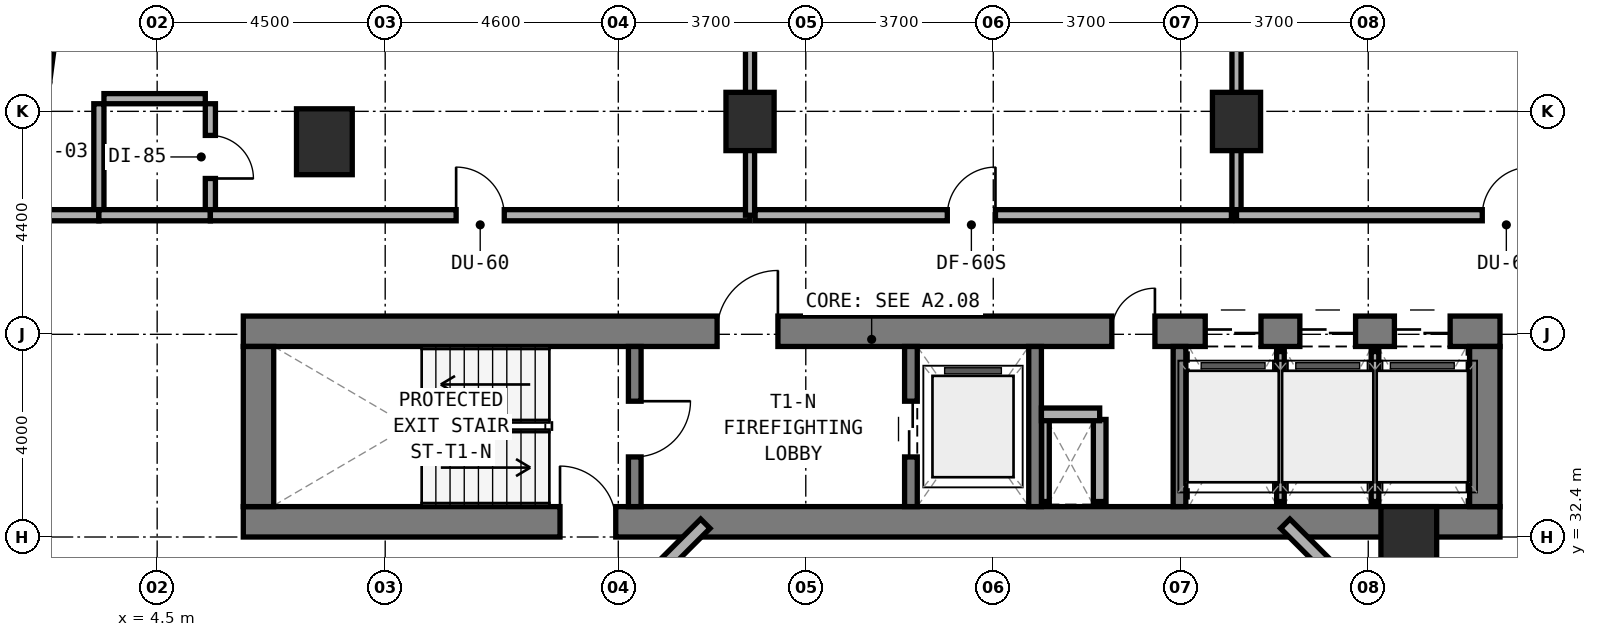
"""IFC4 building model, lengths in metres.
Left out: names, types, materials, properties, quantities, classifications, styles, units other than length and angle.
Written with IfcOpenShell. Run it as: python <this file> out.ifc"""

import sys

from ifc_helpers import new_model, si_unit, direction, frame, frame_2d, origin, origin_2d, place, context, subcontext, project, spatial, rectangle, extrude, element, fill, save


model = new_model("IFC4")
c1 = context("Model", 3, precision=1e-05, world=origin(), true_north=direction((0.0, 1.0)))
c2 = subcontext(c1, "Body", "Model", "MODEL_VIEW")
j1 = project(units=[si_unit("LENGTHUNIT", "METRE"), si_unit("PLANEANGLEUNIT", "RADIAN")], contexts=[c1])
p1 = place(None, origin())
s1 = spatial("IfcSite", under=j1, at=p1, CompositionType="ELEMENT")
p2 = place(p1, origin())
s2 = spatial("IfcBuilding", under=s1, at=p2, CompositionType="ELEMENT")
p3 = place(p2, frame((0.0, 0.0, 24.0)))
s3 = spatial("IfcBuildingStorey", under=s2, at=p3, CompositionType="ELEMENT", Elevation=24.0)
p4 = place(p3, frame((6.2, 32.7, 0.0), z_axis=(0.0, 0.0, 1.0), x_axis=(1.0, 0.0, 0.0)))
e1 = element("IfcWall", 1, at=p4, inside=s3, PredefinedType="SHEAR", context=c2, shape_type="SweptSolid", body=[
    extrude(rectangle(XDim=24.8, YDim=0.6, at=frame_2d((12.4, 0.0))), origin(), (0.0, 0.0, 1.0), 3.5),
])
p5 = place(p4, frame((6.25, 0.0, 0.0)))
e2 = element("IfcOpeningElement", 2, at=p5, cuts=e1, PredefinedType="OPENING", context=c2, shape_type="SweptSolid", body=[
    extrude(rectangle(XDim=1.1, YDim=2.15, at=frame_2d((0.55, 1.075))), frame((0.0, 0.31, 0.0), z_axis=(0.0, -1.0, 0.0), x_axis=(1.0, 0.0, 0.0)), (0.0, 0.0, 1.0), 0.62),
])
p6 = place(p3, frame((6.2, 36.46, 0.0), z_axis=(0.0, 0.0, 1.0), x_axis=(1.0, 0.0, 0.0)))
e3 = element("IfcWall", 3, at=p6, inside=s3, PredefinedType="SHEAR", context=c2, shape_type="SweptSolid", body=[
    extrude(rectangle(XDim=24.8, YDim=0.6, at=frame_2d((12.4, 0.0))), origin(), (0.0, 0.0, 1.0), 3.5),
])
p7 = place(p6, frame((9.35, 0.0, 0.0)))
e4 = element("IfcOpeningElement", 4, at=p7, cuts=e3, PredefinedType="OPENING", context=c2, shape_type="SweptSolid", body=[
    extrude(rectangle(XDim=1.2, YDim=2.15, at=frame_2d((0.6, 1.075))), frame((0.0, 0.31, 0.0), z_axis=(0.0, -1.0, 0.0), x_axis=(1.0, 0.0, 0.0)), (0.0, 0.0, 1.0), 0.62),
])
p8 = place(p6, frame((17.14, 0.0, 0.0)))
e5 = element("IfcOpeningElement", 5, at=p8, cuts=e3, PredefinedType="OPENING", context=c2, shape_type="SweptSolid", body=[
    extrude(rectangle(XDim=0.85, YDim=2.1, at=frame_2d((0.425, 1.05))), frame((0.0, 0.31, 0.0), z_axis=(0.0, -1.0, 0.0), x_axis=(1.0, 0.0, 0.0)), (0.0, 0.0, 1.0), 0.62),
])
p9 = place(p6, frame((18.983, 0.0, 0.0)))
e6 = element("IfcOpeningElement", 6, at=p9, cuts=e3, PredefinedType="OPENING", context=c2, shape_type="SweptSolid", body=[
    extrude(rectangle(XDim=1.1, YDim=2.15, at=frame_2d((0.55, 1.075))), frame((0.0, 0.31, 0.0), z_axis=(0.0, -1.0, 0.0), x_axis=(1.0, 0.0, 0.0)), (0.0, 0.0, 1.0), 0.62),
])
p10 = place(p6, frame((20.85, 0.0, 0.0)))
e7 = element("IfcOpeningElement", 7, at=p10, cuts=e3, PredefinedType="OPENING", context=c2, shape_type="SweptSolid", body=[
    extrude(rectangle(XDim=1.1, YDim=2.15, at=frame_2d((0.55, 1.075))), frame((0.0, 0.31, 0.0), z_axis=(0.0, -1.0, 0.0), x_axis=(1.0, 0.0, 0.0)), (0.0, 0.0, 1.0), 0.62),
])
p11 = place(p6, frame((22.716, 0.0, 0.0)))
e8 = element("IfcOpeningElement", 8, at=p11, cuts=e3, PredefinedType="OPENING", context=c2, shape_type="SweptSolid", body=[
    extrude(rectangle(XDim=1.1, YDim=2.15, at=frame_2d((0.55, 1.075))), frame((0.0, 0.31, 0.0), z_axis=(0.0, -1.0, 0.0), x_axis=(1.0, 0.0, 0.0)), (0.0, 0.0, 1.0), 0.62),
])
for number, where, z_axis, x_axis in (
    (9, (6.5, 33.0, 0.0), (0.0, 0.0, 1.0), (0.0, 1.0, 0.0)),
    (10, (30.7, 33.0, 0.0), (0.0, 0.0, 1.0), (0.0, 1.0, 0.0)),
):
    element("IfcWall", number, at=place(p3, frame(where, z_axis=z_axis, x_axis=x_axis)), inside=s3, PredefinedType="SHEAR", context=c2, shape_type="SweptSolid", body=[
        extrude(rectangle(XDim=3.16, YDim=0.6, at=frame_2d((1.58, 0.0))), origin(), (0.0, 0.0, 1.0), 3.5),
    ])
p12 = place(p3, frame((13.925, 33.0, 0.0), z_axis=(0.0, 0.0, 1.0), x_axis=(0.0, 1.0, 0.0)))
e11 = element("IfcWall", 11, at=p12, inside=s3, PredefinedType="STANDARD", context=c2, shape_type="SweptSolid", body=[
    extrude(rectangle(XDim=3.16, YDim=0.25, at=frame_2d((1.58, 0.0))), origin(), (0.0, 0.0, 1.0), 3.22),
])
p13 = place(p12, frame((0.98, 0.0, 0.0)))
e12 = element("IfcOpeningElement", 12, at=p13, cuts=e11, PredefinedType="OPENING", context=c2, shape_type="SweptSolid", body=[
    extrude(rectangle(XDim=1.1, YDim=2.15, at=frame_2d((0.55, 1.075))), frame((0.0, 0.135, 0.0), z_axis=(0.0, -1.0, 0.0), x_axis=(1.0, 0.0, 0.0)), (0.0, 0.0, 1.0), 0.27),
])
p14 = place(p3, frame((19.375, 33.0, 0.0), z_axis=(0.0, 0.0, 1.0), x_axis=(0.0, 1.0, 0.0)))
e13 = element("IfcWall", 13, at=p14, inside=s3, PredefinedType="STANDARD", context=c2, shape_type="SweptSolid", body=[
    extrude(rectangle(XDim=3.16, YDim=0.25, at=frame_2d((1.58, 0.0))), origin(), (0.0, 0.0, 1.0), 3.22),
])
p15 = place(p14, frame((0.98, 0.0, 0.0)))
e14 = element("IfcOpeningElement", 14, at=p15, cuts=e13, PredefinedType="OPENING", context=c2, shape_type="SweptSolid", body=[
    extrude(rectangle(XDim=1.1, YDim=2.15, at=frame_2d((0.55, 1.075))), frame((0.0, 0.135, 0.0), z_axis=(0.0, -1.0, 0.0), x_axis=(1.0, 0.0, 0.0)), (0.0, 0.0, 1.0), 0.27),
])
for number, where, z_axis, x_axis in (
    (15, (21.825, 33.0, 0.0), (0.0, 0.0, 1.0), (0.0, 1.0, 0.0)),
    (16, (24.675, 33.0, 0.0), (0.0, 0.0, 1.0), (0.0, 1.0, 0.0)),
):
    element("IfcWall", number, at=place(p3, frame(where, z_axis=z_axis, x_axis=x_axis)), inside=s3, PredefinedType="STANDARD", context=c2, shape_type="SweptSolid", body=[
        extrude(rectangle(XDim=3.16, YDim=0.25, at=frame_2d((1.58, 0.0))), origin(), (0.0, 0.0, 1.0), 3.22),
    ])
for number, where, z_axis, x_axis in (
    (17, (16.2, 40.6, 0.0), (0.0, 0.0, 1.0), (1.0, 0.0, 0.0)),
    (18, (25.8, 40.6, 0.0), (0.0, 0.0, 1.0), (1.0, 0.0, 0.0)),
):
    element("IfcColumn", number, at=place(p3, frame(where, z_axis=z_axis, x_axis=x_axis)), inside=s3, PredefinedType="COLUMN", context=c2, shape_type="SweptSolid", body=[
        extrude(rectangle(XDim=0.95, YDim=1.15, at=origin_2d()), origin(), (0.0, 0.0, 1.0), 3.5),
    ])
for number, where, z_axis, x_axis in (
    (19, (7.8, 40.2, 0.0), (0.0, 0.0, 1.0), (1.0, 0.0, 0.0)),
    (20, (29.2, 32.35, 0.0), (0.0, 0.0, 1.0), (1.0, 0.0, 0.0)),
):
    element("IfcColumn", number, at=place(p3, frame(where, z_axis=z_axis, x_axis=x_axis)), inside=s3, PredefinedType="COLUMN", context=c2, shape_type="SweptSolid", body=[
        extrude(rectangle(XDim=1.1, YDim=1.3, at=origin_2d()), origin(), (0.0, 0.0, 1.0), 3.5),
    ])
p16 = place(p3, frame((2.355, 42.337, 0.0), z_axis=(0.0, 0.0, 1.0), x_axis=(-0.130454512571, -0.991454295543, 0.0)))
e21 = element("IfcWall", 21, at=p16, inside=s3, PredefinedType="STANDARD", context=c2, shape_type="SweptSolid", body=[
    extrude(rectangle(XDim=0.973, YDim=0.3, at=frame_2d((0.487, 0.0))), origin(), (0.0, 0.0, 1.0), 3.22),
])
p17 = place(p3, frame((28.596, 30.828, 0.0), z_axis=(0.0, 0.0, 1.0), x_axis=(-0.707059717605, 0.707153841636, 0.0)))
e22 = element("IfcWall", 22, at=p17, inside=s3, PredefinedType="STANDARD", context=c2, shape_type="SweptSolid", body=[
    extrude(rectangle(XDim=2.594, YDim=0.26, at=frame_2d((1.297, 0.0))), origin(), (0.0, 0.0, 1.0), 3.22),
])
p18 = place(p3, frame((15.318, 32.662, 0.0), z_axis=(0.0, 0.0, 1.0), x_axis=(-0.707106781187, -0.707106781187, 0.0)))
e23 = element("IfcWall", 23, at=p18, inside=s3, PredefinedType="STANDARD", context=c2, shape_type="SweptSolid", body=[
    extrude(rectangle(XDim=2.594, YDim=0.26, at=frame_2d((1.297, 0.0))), origin(), (0.0, 0.0, 1.0), 3.22),
])
p19 = place(p3, frame((22.03, 33.1, 0.0), z_axis=(0.0, 0.0, 1.0), x_axis=(0.0, 1.0, 0.0)))
e24 = element("IfcWall", 24, at=p19, inside=s3, PredefinedType="PARTITIONING", context=c2, shape_type="SweptSolid", body=[
    extrude(rectangle(XDim=1.62, YDim=0.15, at=frame_2d((0.81, 0.0))), origin(), (0.0, 0.0, 1.0), 3.22),
])
p20 = place(p3, frame((23.1, 33.1, 0.0), z_axis=(0.0, 0.0, 1.0), x_axis=(0.0, 1.0, 0.0)))
e25 = element("IfcWall", 25, at=p20, inside=s3, PredefinedType="SOLIDWALL", context=c2, shape_type="SweptSolid", body=[
    extrude(rectangle(XDim=1.62, YDim=0.25, at=frame_2d((0.81, 0.0))), origin(), (0.0, 0.0, 1.0), 3.22),
])
p21 = place(p3, frame((21.95, 34.82, 0.0), z_axis=(0.0, 0.0, 1.0), x_axis=(1.0, 0.0, 0.0)))
e26 = element("IfcWall", 26, at=p21, inside=s3, PredefinedType="SOLIDWALL", context=c2, shape_type="SweptSolid", body=[
    extrude(rectangle(XDim=1.15, YDim=0.25, at=frame_2d((0.575, 0.0))), origin(), (0.0, 0.0, 1.0), 3.22),
])
p22 = place(p3, frame((26.667, 33.1, 0.0), z_axis=(0.0, 0.0, 1.0), x_axis=(0.0, 1.0, 0.0)))
e27 = element("IfcWall", 27, at=p22, inside=s3, PredefinedType="PARTITIONING", context=c2, shape_type="SweptSolid", body=[
    extrude(rectangle(XDim=2.96, YDim=0.15, at=frame_2d((1.48, 0.0))), origin(), (0.0, 0.0, 1.0), 3.22),
])
p23 = place(p3, frame((28.533, 33.1, 0.0), z_axis=(0.0, 0.0, 1.0), x_axis=(0.0, 1.0, 0.0)))
e28 = element("IfcWall", 28, at=p23, inside=s3, PredefinedType="PARTITIONING", context=c2, shape_type="SweptSolid", body=[
    extrude(rectangle(XDim=2.96, YDim=0.15, at=frame_2d((1.48, 0.0))), origin(), (0.0, 0.0, 1.0), 2.295),
])
p24 = place(p3, frame((5.55, 38.85, 0.0), z_axis=(0.0, 0.0, 1.0), x_axis=(0.0, 1.0, 0.0)))
e29 = element("IfcWall", 29, at=p24, inside=s3, PredefinedType="PLUMBINGWALL", context=c2, shape_type="SweptSolid", body=[
    extrude(rectangle(XDim=2.1, YDim=0.2, at=frame_2d((1.05, 0.0))), origin(), (0.0, 0.0, 1.0), 3.22),
])
p25 = place(p24, frame((0.625, 0.0, 0.0)))
e30 = element("IfcOpeningElement", 30, at=p25, cuts=e29, PredefinedType="OPENING", context=c2, shape_type="SweptSolid", body=[
    extrude(rectangle(XDim=0.85, YDim=2.1, at=frame_2d((0.425, 1.05))), frame((0.0, 0.11, 0.0), z_axis=(0.0, -1.0, 0.0), x_axis=(1.0, 0.0, 0.0)), (0.0, 0.0, 1.0), 0.22),
])
p26 = place(p3, frame((3.45, 41.05, 0.0), z_axis=(0.0, 0.0, 1.0), x_axis=(1.0, 0.0, 0.0)))
e31 = element("IfcWall", 31, at=p26, inside=s3, PredefinedType="PLUMBINGWALL", context=c2, shape_type="SweptSolid", body=[
    extrude(rectangle(XDim=2.0, YDim=0.2, at=frame_2d((1.0, 0.0))), origin(), (0.0, 0.0, 1.0), 3.22),
])
p27 = place(p3, frame((3.35, 38.85, 0.0), z_axis=(0.0, 0.0, 1.0), x_axis=(0.0, 1.0, 0.0)))
e32 = element("IfcWall", 32, at=p27, inside=s3, PredefinedType="PLUMBINGWALL", context=c2, shape_type="SweptSolid", body=[
    extrude(rectangle(XDim=2.1, YDim=0.2, at=frame_2d((1.05, 0.0))), origin(), (0.0, 0.0, 1.0), 3.22),
])
p28 = place(p3, frame((0.24, 38.75, 0.0), z_axis=(0.0, 0.0, 1.0), x_axis=(1.0, 0.0, 0.0)))
e33 = element("IfcWall", 33, at=p28, inside=s3, PredefinedType="SOLIDWALL", context=c2, shape_type="SweptSolid", body=[
    extrude(rectangle(XDim=3.11, YDim=0.22, at=frame_2d((1.555, 0.0))), origin(), (0.0, 0.0, 1.0), 3.22),
])
p29 = place(p3, frame((3.35, 38.75, 0.0), z_axis=(0.0, 0.0, 1.0), x_axis=(1.0, 0.0, 0.0)))
e34 = element("IfcWall", 34, at=p29, inside=s3, PredefinedType="SOLIDWALL", context=c2, shape_type="SweptSolid", body=[
    extrude(rectangle(XDim=2.2, YDim=0.22, at=frame_2d((1.1, 0.0))), origin(), (0.0, 0.0, 1.0), 3.22),
])
p30 = place(p3, frame((5.55, 38.75, 0.0), z_axis=(0.0, 0.0, 1.0), x_axis=(1.0, 0.0, 0.0)))
e35 = element("IfcWall", 35, at=p30, inside=s3, PredefinedType="SOLIDWALL", context=c2, shape_type="SweptSolid", body=[
    extrude(rectangle(XDim=10.65, YDim=0.22, at=frame_2d((5.325, 0.0))), origin(), (0.0, 0.0, 1.0), 2.295),
])
p31 = place(p30, frame((4.85, 0.0, 0.0)))
e36 = element("IfcOpeningElement", 36, at=p31, cuts=e35, PredefinedType="OPENING", context=c2, shape_type="SweptSolid", body=[
    extrude(rectangle(XDim=0.95, YDim=2.1, at=frame_2d((0.475, 1.05))), frame((0.0, 0.12, 0.0), z_axis=(0.0, -1.0, 0.0), x_axis=(1.0, 0.0, 0.0)), (0.0, 0.0, 1.0), 0.24),
])
p32 = place(p3, frame((16.2, 38.75, 0.0), z_axis=(0.0, 0.0, 1.0), x_axis=(0.0, 1.0, 0.0)))
e37 = element("IfcWall", 37, at=p32, inside=s3, PredefinedType="SOLIDWALL", context=c2, shape_type="SweptSolid", body=[
    extrude(rectangle(XDim=8.19, YDim=0.18, at=frame_2d((4.095, 0.0))), origin(), (0.0, 0.0, 1.0), 2.295),
])
p33 = place(p3, frame((16.3, 38.75, 0.0), z_axis=(0.0, 0.0, 1.0), x_axis=(1.0, 0.0, 0.0)))
e38 = element("IfcWall", 38, at=p33, inside=s3, PredefinedType="SOLIDWALL", context=c2, shape_type="SweptSolid", body=[
    extrude(rectangle(XDim=9.4, YDim=0.22, at=frame_2d((4.7, 0.0))), origin(), (0.0, 0.0, 1.0), 2.955),
])
p34 = place(p33, frame((3.793, 0.0, 0.0)))
e39 = element("IfcOpeningElement", 39, at=p34, cuts=e38, PredefinedType="OPENING", context=c2, shape_type="SweptSolid", body=[
    extrude(rectangle(XDim=0.95, YDim=2.1, at=frame_2d((0.475, 1.05))), frame((0.0, 0.12, 0.0), z_axis=(0.0, -1.0, 0.0), x_axis=(1.0, 0.0, 0.0)), (0.0, 0.0, 1.0), 0.24),
])
p35 = place(p3, frame((25.8, 38.75, 0.0), z_axis=(0.0, 0.0, 1.0), x_axis=(0.0, 1.0, 0.0)))
e40 = element("IfcWall", 40, at=p35, inside=s3, PredefinedType="SOLIDWALL", context=c2, shape_type="SweptSolid", body=[
    extrude(rectangle(XDim=8.19, YDim=0.18, at=frame_2d((4.095, 0.0))), origin(), (0.0, 0.0, 1.0), 2.295),
])
p36 = place(p3, frame((25.8, 38.75, 0.0), z_axis=(0.0, 0.0, 1.0), x_axis=(1.0, 0.0, 0.0)))
e41 = element("IfcWall", 41, at=p36, inside=s3, PredefinedType="SOLIDWALL", context=c2, shape_type="SweptSolid", body=[
    extrude(rectangle(XDim=10.65, YDim=0.22, at=frame_2d((5.325, 0.0))), origin(), (0.0, 0.0, 1.0), 2.295),
])
p37 = place(p36, frame((4.85, 0.0, 0.0)))
e42 = element("IfcOpeningElement", 42, at=p37, cuts=e41, PredefinedType="OPENING", context=c2, shape_type="SweptSolid", body=[
    extrude(rectangle(XDim=0.95, YDim=2.1, at=frame_2d((0.475, 1.05))), frame((0.0, 0.12, 0.0), z_axis=(0.0, -1.0, 0.0), x_axis=(1.0, 0.0, 0.0)), (0.0, 0.0, 1.0), 0.24),
])
p38 = place(p13, frame((1.1, 0.0, 0.0), z_axis=(0.0, 0.0, 1.0), x_axis=(-1.0, 0.0, 0.0)))
e43 = element("IfcDoor", 43, at=p38, inside=s3, OperationType="SINGLE_SWING_LEFT", PredefinedType="DOOR", context=c2, shape_type="SweptSolid", body=[
    extrude(rectangle(XDim=1.1, YDim=2.15, at=frame_2d((0.55, 1.075))), frame((0.0, 0.025, 0.0), z_axis=(0.0, -1.0, 0.0), x_axis=(1.0, 0.0, 0.0)), (0.0, 0.0, 1.0), 0.05),
])
fill(e12, e43)
p39 = place(p7, origin())
e44 = element("IfcDoor", 44, at=p39, inside=s3, OperationType="SINGLE_SWING_RIGHT", PredefinedType="DOOR", context=c2, shape_type="SweptSolid", body=[
    extrude(rectangle(XDim=1.2, YDim=2.15, at=frame_2d((0.6, 1.075))), frame((0.0, 0.025, 0.0), z_axis=(0.0, -1.0, 0.0), x_axis=(1.0, 0.0, 0.0)), (0.0, 0.0, 1.0), 0.05),
])
fill(e4, e44)
p40 = place(p15, origin())
e45 = element("IfcDoor", 45, at=p40, inside=s3, OperationType="DOUBLE_DOOR_SLIDING", PredefinedType="DOOR", context=c2, shape_type="SweptSolid", body=[
    extrude(rectangle(XDim=1.1, YDim=2.15, at=frame_2d((0.55, 1.075))), frame((0.0, 0.025, 0.0), z_axis=(0.0, -1.0, 0.0), x_axis=(1.0, 0.0, 0.0)), (0.0, 0.0, 1.0), 0.05),
])
fill(e14, e45)
p41 = place(p8, origin())
e46 = element("IfcDoor", 46, at=p41, inside=s3, OperationType="SINGLE_SWING_RIGHT", PredefinedType="DOOR", context=c2, shape_type="SweptSolid", body=[
    extrude(rectangle(XDim=0.85, YDim=2.1, at=frame_2d((0.425, 1.05))), frame((0.0, 0.025, 0.0), z_axis=(0.0, -1.0, 0.0), x_axis=(1.0, 0.0, 0.0)), (0.0, 0.0, 1.0), 0.05),
])
fill(e5, e46)
p42 = place(p9, origin())
e47 = element("IfcDoor", 47, at=p42, inside=s3, OperationType="DOUBLE_DOOR_SLIDING", PredefinedType="DOOR", context=c2, shape_type="SweptSolid", body=[
    extrude(rectangle(XDim=1.1, YDim=2.15, at=frame_2d((0.55, 1.075))), frame((0.0, 0.025, 0.0), z_axis=(0.0, -1.0, 0.0), x_axis=(1.0, 0.0, 0.0)), (0.0, 0.0, 1.0), 0.05),
])
fill(e6, e47)
p43 = place(p10, origin())
e48 = element("IfcDoor", 48, at=p43, inside=s3, OperationType="DOUBLE_DOOR_SLIDING", PredefinedType="DOOR", context=c2, shape_type="SweptSolid", body=[
    extrude(rectangle(XDim=1.1, YDim=2.15, at=frame_2d((0.55, 1.075))), frame((0.0, 0.025, 0.0), z_axis=(0.0, -1.0, 0.0), x_axis=(1.0, 0.0, 0.0)), (0.0, 0.0, 1.0), 0.05),
])
fill(e7, e48)
p44 = place(p11, origin())
e49 = element("IfcDoor", 49, at=p44, inside=s3, OperationType="DOUBLE_DOOR_SLIDING", PredefinedType="DOOR", context=c2, shape_type="SweptSolid", body=[
    extrude(rectangle(XDim=1.1, YDim=2.15, at=frame_2d((0.55, 1.075))), frame((0.0, 0.025, 0.0), z_axis=(0.0, -1.0, 0.0), x_axis=(1.0, 0.0, 0.0)), (0.0, 0.0, 1.0), 0.05),
])
fill(e8, e49)
p45 = place(p5, origin())
e50 = element("IfcDoor", 50, at=p45, inside=s3, OperationType="SINGLE_SWING_LEFT", PredefinedType="DOOR", context=c2, shape_type="SweptSolid", body=[
    extrude(rectangle(XDim=1.1, YDim=2.15, at=frame_2d((0.55, 1.075))), frame((0.0, 0.025, 0.0), z_axis=(0.0, -1.0, 0.0), x_axis=(1.0, 0.0, 0.0)), (0.0, 0.0, 1.0), 0.05),
])
fill(e2, e50)
p46 = place(p25, frame((0.85, 0.0, 0.0), z_axis=(0.0, 0.0, 1.0), x_axis=(-1.0, 0.0, 0.0)))
e51 = element("IfcDoor", 51, at=p46, inside=s3, OperationType="SINGLE_SWING_RIGHT", PredefinedType="DOOR", context=c2, shape_type="SweptSolid", body=[
    extrude(rectangle(XDim=0.85, YDim=2.1, at=frame_2d((0.425, 1.05))), frame((0.0, 0.025, 0.0), z_axis=(0.0, -1.0, 0.0), x_axis=(1.0, 0.0, 0.0)), (0.0, 0.0, 1.0), 0.05),
])
fill(e30, e51)
p47 = place(p31, origin())
e52 = element("IfcDoor", 52, at=p47, inside=s3, OperationType="SINGLE_SWING_LEFT", PredefinedType="DOOR", context=c2, shape_type="SweptSolid", body=[
    extrude(rectangle(XDim=0.95, YDim=2.1, at=frame_2d((0.475, 1.05))), frame((0.0, 0.025, 0.0), z_axis=(0.0, -1.0, 0.0), x_axis=(1.0, 0.0, 0.0)), (0.0, 0.0, 1.0), 0.05),
])
fill(e36, e52)
p48 = place(p34, origin())
e53 = element("IfcDoor", 53, at=p48, inside=s3, OperationType="SINGLE_SWING_RIGHT", PredefinedType="DOOR", context=c2, shape_type="SweptSolid", body=[
    extrude(rectangle(XDim=0.95, YDim=2.1, at=frame_2d((0.475, 1.05))), frame((0.0, 0.025, 0.0), z_axis=(0.0, -1.0, 0.0), x_axis=(1.0, 0.0, 0.0)), (0.0, 0.0, 1.0), 0.05),
])
fill(e39, e53)
p49 = place(p37, origin())
e54 = element("IfcDoor", 54, at=p49, inside=s3, OperationType="SINGLE_SWING_RIGHT", PredefinedType="DOOR", context=c2, shape_type="SweptSolid", body=[
    extrude(rectangle(XDim=0.95, YDim=2.1, at=frame_2d((0.475, 1.05))), frame((0.0, 0.025, 0.0), z_axis=(0.0, -1.0, 0.0), x_axis=(1.0, 0.0, 0.0)), (0.0, 0.0, 1.0), 0.05),
])
fill(e42, e54)
save(model, sys.argv[1])
